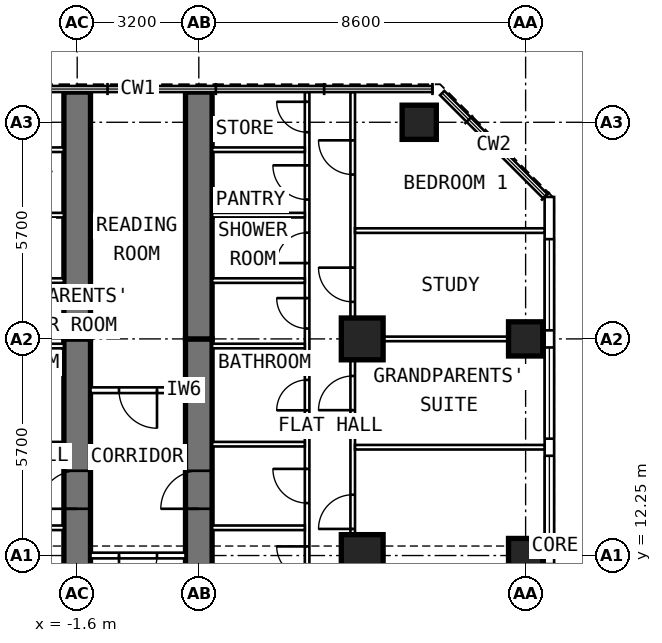
"""IFC4 building model, lengths in metres.
Left out: names, types, materials, properties, quantities, classifications, styles, units other than length and angle.
Written with IfcOpenShell. Run it as: python <this file> out.ifc"""

import sys

from ifc_helpers import new_model, si_unit, direction, frame, frame_2d, origin, origin_2d, place, context, subcontext, project, spatial, rectangle, extrude, element, fill, save


model = new_model("IFC4")
c1 = context("Model", 3, precision=1e-05, world=origin(), true_north=direction((0.0, 1.0)))
c2 = subcontext(c1, "Body", "Model", "MODEL_VIEW")
j1 = project(units=[si_unit("LENGTHUNIT", "METRE"), si_unit("PLANEANGLEUNIT", "RADIAN")], contexts=[c1])
p1 = place(None, origin())
s1 = spatial("IfcSite", under=j1, at=p1, CompositionType="ELEMENT")
p2 = place(p1, origin())
s2 = spatial("IfcBuilding", under=s1, at=p2, CompositionType="ELEMENT")
p3 = place(p2, frame((0.0, 0.0, 193.8)))
s3 = spatial("IfcBuildingStorey", under=s2, at=p3, CompositionType="ELEMENT", Elevation=193.8)
for number, where, z_axis, x_axis in (
    (1, (10.2, 12.25, 0.0), (0.0, 0.0, 1.0), (0.0, 1.0, 0.0)),
    (2, (10.2, 17.95, 0.0), (0.0, 0.0, 1.0), (0.0, 1.0, 0.0)),
    (3, (7.4, 23.65, 0.0), (0.0, 0.0, 1.0), (0.0, 1.0, 0.0)),
):
    element("IfcColumn", number, at=place(p3, frame(where, z_axis=z_axis, x_axis=x_axis)), inside=s3, PredefinedType="COLUMN", context=c2, shape_type="SweptSolid", body=[
        extrude(rectangle(XDim=0.9, YDim=0.9, at=origin_2d()), origin(), (0.0, 0.0, 1.0), 3.6),
    ])
for number, where, z_axis, x_axis in (
    (4, (5.9, 12.25, 0.0), (0.0, 0.0, 1.0), (0.0, 1.0, 0.0)),
    (5, (5.9, 17.95, 0.0), (0.0, 0.0, 1.0), (0.0, 1.0, 0.0)),
):
    element("IfcColumn", number, at=place(p3, frame(where, z_axis=z_axis, x_axis=x_axis)), inside=s3, PredefinedType="COLUMN", context=c2, shape_type="SweptSolid", body=[
        extrude(rectangle(XDim=1.1, YDim=1.1, at=origin_2d()), origin(), (0.0, 0.0, 1.0), 3.6),
    ])
p4 = place(p3, frame((-1.6, 9.6, 0.0), z_axis=(0.0, 0.0, 1.0), x_axis=(0.0, 1.0, 0.0)))
e6 = element("IfcWall", 6, at=p4, inside=s3, PredefinedType="SHEAR", context=c2, shape_type="SweptSolid", body=[
    extrude(rectangle(XDim=8.35, YDim=0.7, at=frame_2d((4.175, 0.0))), origin(), (0.0, 0.0, 1.0), 3.6),
])
p5 = place(p4, frame((3.88, 0.0, 0.0)))
e7 = element("IfcOpeningElement", 7, at=p5, cuts=e6, PredefinedType="OPENING", context=c2, shape_type="SweptSolid", body=[
    extrude(rectangle(XDim=1.0, YDim=2.1, at=frame_2d((0.5, 1.05))), frame((0.0, 0.362, 0.0), z_axis=(0.0, -1.0, 0.0), x_axis=(1.0, 0.0, 0.0)), (0.0, 0.0, 1.0), 0.724),
])
p6 = place(p3, frame((-1.6, 17.95, 0.0), z_axis=(0.0, 0.0, 1.0), x_axis=(0.0, 1.0, 0.0)))
e8 = element("IfcWall", 8, at=p6, inside=s3, PredefinedType="SHEAR", context=c2, shape_type="SweptSolid", body=[
    extrude(rectangle(XDim=6.495, YDim=0.7, at=frame_2d((3.248, 0.0))), origin(), (0.0, 0.0, 1.0), 3.6),
])
p7 = place(p3, frame((1.6, 9.6, 0.0), z_axis=(0.0, 0.0, 1.0), x_axis=(0.0, 1.0, 0.0)))
e9 = element("IfcWall", 9, at=p7, inside=s3, PredefinedType="SHEAR", context=c2, shape_type="SweptSolid", body=[
    extrude(rectangle(XDim=8.35, YDim=0.7, at=frame_2d((4.175, 0.0))), origin(), (0.0, 0.0, 1.0), 3.6),
])
p8 = place(p7, frame((3.88, 0.0, 0.0)))
e10 = element("IfcOpeningElement", 10, at=p8, cuts=e9, PredefinedType="OPENING", context=c2, shape_type="SweptSolid", body=[
    extrude(rectangle(XDim=1.0, YDim=2.1, at=frame_2d((0.5, 1.05))), frame((0.0, 0.362, 0.0), z_axis=(0.0, -1.0, 0.0), x_axis=(1.0, 0.0, 0.0)), (0.0, 0.0, 1.0), 0.724),
])
p9 = place(p3, frame((1.6, 17.95, 0.0), z_axis=(0.0, 0.0, 1.0), x_axis=(0.0, 1.0, 0.0)))
e11 = element("IfcWall", 11, at=p9, inside=s3, PredefinedType="SHEAR", context=c2, shape_type="SweptSolid", body=[
    extrude(rectangle(XDim=6.495, YDim=0.7, at=frame_2d((3.248, 0.0))), origin(), (0.0, 0.0, 1.0), 3.6),
])
p10 = place(p3, frame((10.825, 6.409, 0.0), z_axis=(0.0, 0.0, 1.0), x_axis=(0.0, 1.0, 0.0)))
e12 = element("IfcWall", 12, at=p10, inside=s3, PredefinedType="SOLIDWALL", context=c2, shape_type="SweptSolid", body=[
    extrude(rectangle(XDim=15.276, YDim=0.25, at=frame_2d((7.638, 0.0))), origin(), (0.0, 0.0, 1.0), 3.35),
])
p11 = place(p10, frame((0.366, 0.0, 0.8)))
e13 = element("IfcOpeningElement", 13, at=p11, cuts=e12, PredefinedType="OPENING", context=c2, shape_type="SweptSolid", body=[
    extrude(rectangle(XDim=2.4, YDim=1.8, at=frame_2d((1.2, 0.9))), frame((0.0, 0.137, 0.0), z_axis=(0.0, -1.0, 0.0), x_axis=(1.0, 0.0, 0.0)), (0.0, 0.0, 1.0), 0.274),
])
p12 = place(p10, frame((3.216, 0.0, 0.8)))
e14 = element("IfcOpeningElement", 14, at=p12, cuts=e12, PredefinedType="OPENING", context=c2, shape_type="SweptSolid", body=[
    extrude(rectangle(XDim=2.4, YDim=1.8, at=frame_2d((1.2, 0.9))), frame((0.0, 0.137, 0.0), z_axis=(0.0, -1.0, 0.0), x_axis=(1.0, 0.0, 0.0)), (0.0, 0.0, 1.0), 0.274),
])
p13 = place(p10, frame((6.066, 0.0, 0.8)))
e15 = element("IfcOpeningElement", 15, at=p13, cuts=e12, PredefinedType="OPENING", context=c2, shape_type="SweptSolid", body=[
    extrude(rectangle(XDim=2.4, YDim=1.8, at=frame_2d((1.2, 0.9))), frame((0.0, 0.137, 0.0), z_axis=(0.0, -1.0, 0.0), x_axis=(1.0, 0.0, 0.0)), (0.0, 0.0, 1.0), 0.274),
])
p14 = place(p10, frame((8.916, 0.0, 0.8)))
e16 = element("IfcOpeningElement", 16, at=p14, cuts=e12, PredefinedType="OPENING", context=c2, shape_type="SweptSolid", body=[
    extrude(rectangle(XDim=2.4, YDim=1.8, at=frame_2d((1.2, 0.9))), frame((0.0, 0.137, 0.0), z_axis=(0.0, -1.0, 0.0), x_axis=(1.0, 0.0, 0.0)), (0.0, 0.0, 1.0), 0.274),
])
p15 = place(p10, frame((11.766, 0.0, 0.8)))
e17 = element("IfcOpeningElement", 17, at=p15, cuts=e12, PredefinedType="OPENING", context=c2, shape_type="SweptSolid", body=[
    extrude(rectangle(XDim=2.4, YDim=1.8, at=frame_2d((1.2, 0.9))), frame((0.0, 0.137, 0.0), z_axis=(0.0, -1.0, 0.0), x_axis=(1.0, 0.0, 0.0)), (0.0, 0.0, 1.0), 0.274),
])
for number, where, z_axis, x_axis in (
    (18, (-1.95, 12.98, 0.0), (0.0, 0.0, 1.0), (-1.0, 0.0, 0.0)),
    (19, (-1.95, 15.18, 0.0), (0.0, 0.0, 1.0), (-1.0, 0.0, 0.0)),
):
    element("IfcWall", number, at=place(p3, frame(where, z_axis=z_axis, x_axis=x_axis)), inside=s3, PredefinedType="PARTITIONING", context=c2, shape_type="SweptSolid", body=[
        extrude(rectangle(XDim=2.44, YDim=0.12, at=frame_2d((1.22, 0.0))), origin(), (0.0, 0.0, 1.0), 3.35),
    ])
p16 = place(p3, frame((-1.95, 17.763, 0.0), z_axis=(0.0, 0.0, 1.0), x_axis=(-1.0, 0.0, 0.0)))
e20 = element("IfcWall", 20, at=p16, inside=s3, PredefinedType="PARTITIONING", context=c2, shape_type="SweptSolid", body=[
    extrude(rectangle(XDim=2.44, YDim=0.12, at=frame_2d((1.22, 0.0))), origin(), (0.0, 0.0, 1.0), 2.45),
])
for number, where, z_axis, x_axis in (
    (21, (-1.95, 19.485, 0.0), (0.0, 0.0, 1.0), (-1.0, 0.0, 0.0)),
    (22, (-1.95, 21.206, 0.0), (0.0, 0.0, 1.0), (-1.0, 0.0, 0.0)),
    (23, (-1.95, 22.928, 0.0), (0.0, 0.0, 1.0), (-1.0, 0.0, 0.0)),
):
    element("IfcWall", number, at=place(p3, frame(where, z_axis=z_axis, x_axis=x_axis)), inside=s3, PredefinedType="PARTITIONING", context=c2, shape_type="SweptSolid", body=[
        extrude(rectangle(XDim=2.44, YDim=0.12, at=frame_2d((1.22, 0.0))), origin(), (0.0, 0.0, 1.0), 3.35),
    ])
p17 = place(p3, frame((4.45, 9.925, 0.0), z_axis=(0.0, 0.0, 1.0), x_axis=(0.0, 1.0, 0.0)))
e24 = element("IfcWall", 24, at=p17, inside=s3, PredefinedType="PARTITIONING", context=c2, shape_type="SweptSolid", body=[
    extrude(rectangle(XDim=14.52, YDim=0.12, at=frame_2d((7.26, 0.0))), origin(), (0.0, 0.0, 1.0), 3.35),
])
p18 = place(p17, frame((1.765, 0.0, 0.0)))
e25 = element("IfcOpeningElement", 25, at=p18, cuts=e24, PredefinedType="OPENING", context=c2, shape_type="SweptSolid", body=[
    extrude(rectangle(XDim=0.8, YDim=2.1, at=frame_2d((0.4, 1.05))), frame((0.0, 0.072, 0.0), z_axis=(0.0, -1.0, 0.0), x_axis=(1.0, 0.0, 0.0)), (0.0, 0.0, 1.0), 0.144),
])
p19 = place(p17, frame((3.705, 0.0, 0.0)))
e26 = element("IfcOpeningElement", 26, at=p19, cuts=e24, PredefinedType="OPENING", context=c2, shape_type="SweptSolid", body=[
    extrude(rectangle(XDim=0.9, YDim=2.1, at=frame_2d((0.45, 1.05))), frame((0.0, 0.072, 0.0), z_axis=(0.0, -1.0, 0.0), x_axis=(1.0, 0.0, 0.0)), (0.0, 0.0, 1.0), 0.144),
])
p20 = place(p17, frame((6.146, 0.0, 0.0)))
e27 = element("IfcOpeningElement", 27, at=p20, cuts=e24, PredefinedType="OPENING", context=c2, shape_type="SweptSolid", body=[
    extrude(rectangle(XDim=0.8, YDim=2.1, at=frame_2d((0.4, 1.05))), frame((0.0, 0.072, 0.0), z_axis=(0.0, -1.0, 0.0), x_axis=(1.0, 0.0, 0.0)), (0.0, 0.0, 1.0), 0.144),
])
p21 = place(p17, frame((8.299, 0.0, 0.0)))
e28 = element("IfcOpeningElement", 28, at=p21, cuts=e24, PredefinedType="OPENING", context=c2, shape_type="SweptSolid", body=[
    extrude(rectangle(XDim=0.8, YDim=2.1, at=frame_2d((0.4, 1.05))), frame((0.0, 0.072, 0.0), z_axis=(0.0, -1.0, 0.0), x_axis=(1.0, 0.0, 0.0)), (0.0, 0.0, 1.0), 0.144),
])
p22 = place(p17, frame((10.021, 0.0, 0.0)))
e29 = element("IfcOpeningElement", 29, at=p22, cuts=e24, PredefinedType="OPENING", context=c2, shape_type="SweptSolid", body=[
    extrude(rectangle(XDim=0.8, YDim=2.1, at=frame_2d((0.4, 1.05))), frame((0.0, 0.072, 0.0), z_axis=(0.0, -1.0, 0.0), x_axis=(1.0, 0.0, 0.0)), (0.0, 0.0, 1.0), 0.144),
])
p23 = place(p17, frame((11.692, 0.0, 0.0)))
e30 = element("IfcOpeningElement", 30, at=p23, cuts=e24, PredefinedType="OPENING", context=c2, shape_type="SweptSolid", body=[
    extrude(rectangle(XDim=0.9, YDim=2.1, at=frame_2d((0.45, 1.05))), frame((0.0, 0.072, 0.0), z_axis=(0.0, -1.0, 0.0), x_axis=(1.0, 0.0, 0.0)), (0.0, 0.0, 1.0), 0.144),
])
p24 = place(p17, frame((13.464, 0.0, 0.0)))
e31 = element("IfcOpeningElement", 31, at=p24, cuts=e24, PredefinedType="OPENING", context=c2, shape_type="SweptSolid", body=[
    extrude(rectangle(XDim=0.8, YDim=2.1, at=frame_2d((0.4, 1.05))), frame((0.0, 0.072, 0.0), z_axis=(0.0, -1.0, 0.0), x_axis=(1.0, 0.0, 0.0)), (0.0, 0.0, 1.0), 0.144),
])
p25 = place(p3, frame((5.65, 9.6, 0.0), z_axis=(0.0, 0.0, 1.0), x_axis=(0.0, 1.0, 0.0)))
e32 = element("IfcWall", 32, at=p25, inside=s3, PredefinedType="PARTITIONING", context=c2, shape_type="SweptSolid", body=[
    extrude(rectangle(XDim=14.845, YDim=0.12, at=frame_2d((7.422, 0.0))), origin(), (0.0, 0.0, 1.0), 3.35),
])
p26 = place(p25, frame((3.35, 0.0, 0.0)))
e33 = element("IfcOpeningElement", 33, at=p26, cuts=e32, PredefinedType="OPENING", context=c2, shape_type="SweptSolid", body=[
    extrude(rectangle(XDim=0.9, YDim=2.1, at=frame_2d((0.45, 1.05))), frame((0.0, 0.072, 0.0), z_axis=(0.0, -1.0, 0.0), x_axis=(1.0, 0.0, 0.0)), (0.0, 0.0, 1.0), 0.144),
])
p27 = place(p25, frame((6.475, 0.0, 0.0)))
e34 = element("IfcOpeningElement", 34, at=p27, cuts=e32, PredefinedType="OPENING", context=c2, shape_type="SweptSolid", body=[
    extrude(rectangle(XDim=0.9, YDim=2.1, at=frame_2d((0.45, 1.05))), frame((0.0, 0.072, 0.0), z_axis=(0.0, -1.0, 0.0), x_axis=(1.0, 0.0, 0.0)), (0.0, 0.0, 1.0), 0.144),
])
p28 = place(p25, frame((9.325, 0.0, 0.0)))
e35 = element("IfcOpeningElement", 35, at=p28, cuts=e32, PredefinedType="OPENING", context=c2, shape_type="SweptSolid", body=[
    extrude(rectangle(XDim=0.9, YDim=2.1, at=frame_2d((0.45, 1.05))), frame((0.0, 0.072, 0.0), z_axis=(0.0, -1.0, 0.0), x_axis=(1.0, 0.0, 0.0)), (0.0, 0.0, 1.0), 0.144),
])
p29 = place(p25, frame((12.675, 0.0, 0.0)))
e36 = element("IfcOpeningElement", 36, at=p29, cuts=e32, PredefinedType="OPENING", context=c2, shape_type="SweptSolid", body=[
    extrude(rectangle(XDim=0.9, YDim=2.1, at=frame_2d((0.45, 1.05))), frame((0.0, 0.072, 0.0), z_axis=(0.0, -1.0, 0.0), x_axis=(1.0, 0.0, 0.0)), (0.0, 0.0, 1.0), 0.144),
])
p30 = place(p3, frame((5.71, 15.1, 0.0), z_axis=(0.0, 0.0, 1.0), x_axis=(1.0, 0.0, 0.0)))
e37 = element("IfcWall", 37, at=p30, inside=s3, PredefinedType="PARTITIONING", context=c2, shape_type="SweptSolid", body=[
    extrude(rectangle(XDim=4.99, YDim=0.12, at=frame_2d((2.495, 0.0))), origin(), (0.0, 0.0, 1.0), 3.35),
])
p31 = place(p3, frame((5.71, 17.95, 0.0), z_axis=(0.0, 0.0, 1.0), x_axis=(1.0, 0.0, 0.0)))
e38 = element("IfcWall", 38, at=p31, inside=s3, PredefinedType="PARTITIONING", context=c2, shape_type="SweptSolid", body=[
    extrude(rectangle(XDim=4.99, YDim=0.12, at=frame_2d((2.495, 0.0))), origin(), (0.0, 0.0, 1.0), 2.45),
])
p32 = place(p3, frame((5.71, 20.8, 0.0), z_axis=(0.0, 0.0, 1.0), x_axis=(1.0, 0.0, 0.0)))
e39 = element("IfcWall", 39, at=p32, inside=s3, PredefinedType="PARTITIONING", context=c2, shape_type="SweptSolid", body=[
    extrude(rectangle(XDim=4.99, YDim=0.12, at=frame_2d((2.495, 0.0))), origin(), (0.0, 0.0, 1.0), 3.35),
])
for number, where, z_axis, x_axis in (
    (40, (1.95, 12.98, 0.0), (0.0, 0.0, 1.0), (1.0, 0.0, 0.0)),
    (41, (1.95, 15.18, 0.0), (0.0, 0.0, 1.0), (1.0, 0.0, 0.0)),
):
    element("IfcWall", number, at=place(p3, frame(where, z_axis=z_axis, x_axis=x_axis)), inside=s3, PredefinedType="PARTITIONING", context=c2, shape_type="SweptSolid", body=[
        extrude(rectangle(XDim=2.44, YDim=0.12, at=frame_2d((1.22, 0.0))), origin(), (0.0, 0.0, 1.0), 3.35),
    ])
p33 = place(p3, frame((1.95, 17.763, 0.0), z_axis=(0.0, 0.0, 1.0), x_axis=(1.0, 0.0, 0.0)))
e42 = element("IfcWall", 42, at=p33, inside=s3, PredefinedType="PARTITIONING", context=c2, shape_type="SweptSolid", body=[
    extrude(rectangle(XDim=2.44, YDim=0.12, at=frame_2d((1.22, 0.0))), origin(), (0.0, 0.0, 1.0), 2.45),
])
for number, where, z_axis, x_axis in (
    (43, (1.95, 19.485, 0.0), (0.0, 0.0, 1.0), (1.0, 0.0, 0.0)),
    (44, (1.95, 21.206, 0.0), (0.0, 0.0, 1.0), (1.0, 0.0, 0.0)),
    (45, (1.95, 22.928, 0.0), (0.0, 0.0, 1.0), (1.0, 0.0, 0.0)),
):
    element("IfcWall", number, at=place(p3, frame(where, z_axis=z_axis, x_axis=x_axis)), inside=s3, PredefinedType="PARTITIONING", context=c2, shape_type="SweptSolid", body=[
        extrude(rectangle(XDim=2.44, YDim=0.12, at=frame_2d((1.22, 0.0))), origin(), (0.0, 0.0, 1.0), 3.35),
    ])
p34 = place(p3, frame((1.25, 16.6, 0.0), z_axis=(0.0, 0.0, 1.0), x_axis=(-1.0, 0.0, 0.0)))
e46 = element("IfcWall", 46, at=p34, inside=s3, PredefinedType="PARTITIONING", context=c2, shape_type="SweptSolid", body=[
    extrude(rectangle(XDim=2.5, YDim=0.15, at=frame_2d((1.25, 0.0))), origin(), (0.0, 0.0, 1.0), 3.35),
])
p35 = place(p34, frame((0.75, 0.0, 0.0)))
e47 = element("IfcOpeningElement", 47, at=p35, cuts=e46, PredefinedType="OPENING", context=c2, shape_type="SweptSolid", body=[
    extrude(rectangle(XDim=1.0, YDim=2.1, at=frame_2d((0.5, 1.05))), frame((0.0, 0.087, 0.0), z_axis=(0.0, -1.0, 0.0), x_axis=(1.0, 0.0, 0.0)), (0.0, 0.0, 1.0), 0.174),
])
p36 = place(p3, frame((1.25, 12.25, 0.0), z_axis=(0.0, 0.0, 1.0), x_axis=(-1.0, 0.0, 0.0)))
e48 = element("IfcWall", 48, at=p36, inside=s3, PredefinedType="PARTITIONING", context=c2, shape_type="SweptSolid", body=[
    extrude(rectangle(XDim=2.5, YDim=0.15, at=frame_2d((1.25, 0.0))), origin(), (0.0, 0.0, 1.0), 3.35),
])
p37 = place(p36, frame((0.75, 0.0, 0.0)))
e49 = element("IfcOpeningElement", 49, at=p37, cuts=e48, PredefinedType="OPENING", context=c2, shape_type="SweptSolid", body=[
    extrude(rectangle(XDim=1.0, YDim=2.1, at=frame_2d((0.5, 1.05))), frame((0.0, 0.087, 0.0), z_axis=(0.0, -1.0, 0.0), x_axis=(1.0, 0.0, 0.0)), (0.0, 0.0, 1.0), 0.174),
])
p38 = place(p13, origin())
e50 = element("IfcWindow", 50, at=p38, inside=s3, PartitioningType="SINGLE_PANEL", PredefinedType="WINDOW", context=c2, shape_type="SweptSolid", body=[
    extrude(rectangle(XDim=2.4, YDim=1.8, at=frame_2d((1.2, 0.9))), frame((0.0, 0.03, 0.0), z_axis=(0.0, -1.0, 0.0), x_axis=(1.0, 0.0, 0.0)), (0.0, 0.0, 1.0), 0.06),
])
fill(e15, e50)
p39 = place(p14, origin())
e51 = element("IfcWindow", 51, at=p39, inside=s3, PartitioningType="SINGLE_PANEL", PredefinedType="WINDOW", context=c2, shape_type="SweptSolid", body=[
    extrude(rectangle(XDim=2.4, YDim=1.8, at=frame_2d((1.2, 0.9))), frame((0.0, 0.03, 0.0), z_axis=(0.0, -1.0, 0.0), x_axis=(1.0, 0.0, 0.0)), (0.0, 0.0, 1.0), 0.06),
])
fill(e16, e51)
p40 = place(p15, origin())
e52 = element("IfcWindow", 52, at=p40, inside=s3, PartitioningType="SINGLE_PANEL", PredefinedType="WINDOW", context=c2, shape_type="SweptSolid", body=[
    extrude(rectangle(XDim=2.4, YDim=1.8, at=frame_2d((1.2, 0.9))), frame((0.0, 0.03, 0.0), z_axis=(0.0, -1.0, 0.0), x_axis=(1.0, 0.0, 0.0)), (0.0, 0.0, 1.0), 0.06),
])
fill(e17, e52)
p41 = place(p5, origin())
e53 = element("IfcDoor", 53, at=p41, inside=s3, OperationType="SINGLE_SWING_LEFT", PredefinedType="DOOR", context=c2, shape_type="SweptSolid", body=[
    extrude(rectangle(XDim=1.0, YDim=2.1, at=frame_2d((0.5, 1.05))), frame((0.0, 0.1, 0.0), z_axis=(0.0, -1.0, 0.0), x_axis=(1.0, 0.0, 0.0)), (0.0, 0.0, 1.0), 0.2),
])
fill(e7, e53)
p42 = place(p8, origin())
e54 = element("IfcDoor", 54, at=p42, inside=s3, OperationType="SINGLE_SWING_LEFT", PredefinedType="DOOR", context=c2, shape_type="SweptSolid", body=[
    extrude(rectangle(XDim=1.0, YDim=2.1, at=frame_2d((0.5, 1.05))), frame((0.0, 0.1, 0.0), z_axis=(0.0, -1.0, 0.0), x_axis=(1.0, 0.0, 0.0)), (0.0, 0.0, 1.0), 0.2),
])
fill(e10, e54)
p43 = place(p26, origin())
e55 = element("IfcDoor", 55, at=p43, inside=s3, OperationType="SINGLE_SWING_LEFT", PredefinedType="DOOR", context=c2, shape_type="SweptSolid", body=[
    extrude(rectangle(XDim=0.9, YDim=2.1, at=frame_2d((0.45, 1.05))), frame((0.0, 0.025, 0.0), z_axis=(0.0, -1.0, 0.0), x_axis=(1.0, 0.0, 0.0)), (0.0, 0.0, 1.0), 0.05),
])
fill(e33, e55)
p44 = place(p27, origin())
e56 = element("IfcDoor", 56, at=p44, inside=s3, OperationType="SINGLE_SWING_LEFT", PredefinedType="DOOR", context=c2, shape_type="SweptSolid", body=[
    extrude(rectangle(XDim=0.9, YDim=2.1, at=frame_2d((0.45, 1.05))), frame((0.0, 0.025, 0.0), z_axis=(0.0, -1.0, 0.0), x_axis=(1.0, 0.0, 0.0)), (0.0, 0.0, 1.0), 0.05),
])
fill(e34, e56)
p45 = place(p28, origin())
e57 = element("IfcDoor", 57, at=p45, inside=s3, OperationType="SINGLE_SWING_RIGHT", PredefinedType="DOOR", context=c2, shape_type="SweptSolid", body=[
    extrude(rectangle(XDim=0.9, YDim=2.1, at=frame_2d((0.45, 1.05))), frame((0.0, 0.025, 0.0), z_axis=(0.0, -1.0, 0.0), x_axis=(1.0, 0.0, 0.0)), (0.0, 0.0, 1.0), 0.05),
])
fill(e35, e57)
p46 = place(p29, origin())
e58 = element("IfcDoor", 58, at=p46, inside=s3, OperationType="SINGLE_SWING_RIGHT", PredefinedType="DOOR", context=c2, shape_type="SweptSolid", body=[
    extrude(rectangle(XDim=0.9, YDim=2.1, at=frame_2d((0.45, 1.05))), frame((0.0, 0.025, 0.0), z_axis=(0.0, -1.0, 0.0), x_axis=(1.0, 0.0, 0.0)), (0.0, 0.0, 1.0), 0.05),
])
fill(e36, e58)
p47 = place(p18, origin())
e59 = element("IfcDoor", 59, at=p47, inside=s3, OperationType="SINGLE_SWING_RIGHT", PredefinedType="DOOR", context=c2, shape_type="SweptSolid", body=[
    extrude(rectangle(XDim=0.8, YDim=2.1, at=frame_2d((0.4, 1.05))), frame((0.0, 0.025, 0.0), z_axis=(0.0, -1.0, 0.0), x_axis=(1.0, 0.0, 0.0)), (0.0, 0.0, 1.0), 0.05),
])
fill(e25, e59)
p48 = place(p19, origin())
e60 = element("IfcDoor", 60, at=p48, inside=s3, OperationType="SINGLE_SWING_RIGHT", PredefinedType="DOOR", context=c2, shape_type="SweptSolid", body=[
    extrude(rectangle(XDim=0.9, YDim=2.1, at=frame_2d((0.45, 1.05))), frame((0.0, 0.025, 0.0), z_axis=(0.0, -1.0, 0.0), x_axis=(1.0, 0.0, 0.0)), (0.0, 0.0, 1.0), 0.05),
])
fill(e26, e60)
p49 = place(p20, origin())
e61 = element("IfcDoor", 61, at=p49, inside=s3, OperationType="SINGLE_SWING_LEFT", PredefinedType="DOOR", context=c2, shape_type="SweptSolid", body=[
    extrude(rectangle(XDim=0.8, YDim=2.1, at=frame_2d((0.4, 1.05))), frame((0.0, 0.025, 0.0), z_axis=(0.0, -1.0, 0.0), x_axis=(1.0, 0.0, 0.0)), (0.0, 0.0, 1.0), 0.05),
])
fill(e27, e61)
p50 = place(p21, origin())
e62 = element("IfcDoor", 62, at=p50, inside=s3, OperationType="SINGLE_SWING_RIGHT", PredefinedType="DOOR", context=c2, shape_type="SweptSolid", body=[
    extrude(rectangle(XDim=0.8, YDim=2.1, at=frame_2d((0.4, 1.05))), frame((0.0, 0.025, 0.0), z_axis=(0.0, -1.0, 0.0), x_axis=(1.0, 0.0, 0.0)), (0.0, 0.0, 1.0), 0.05),
])
fill(e28, e62)
p51 = place(p22, origin())
e63 = element("IfcDoor", 63, at=p51, inside=s3, OperationType="SINGLE_SWING_LEFT", PredefinedType="DOOR", context=c2, shape_type="SweptSolid", body=[
    extrude(rectangle(XDim=0.8, YDim=2.1, at=frame_2d((0.4, 1.05))), frame((0.0, 0.025, 0.0), z_axis=(0.0, -1.0, 0.0), x_axis=(1.0, 0.0, 0.0)), (0.0, 0.0, 1.0), 0.05),
])
fill(e29, e63)
p52 = place(p23, origin())
e64 = element("IfcDoor", 64, at=p52, inside=s3, OperationType="SINGLE_SWING_RIGHT", PredefinedType="DOOR", context=c2, shape_type="SweptSolid", body=[
    extrude(rectangle(XDim=0.9, YDim=2.1, at=frame_2d((0.45, 1.05))), frame((0.0, 0.025, 0.0), z_axis=(0.0, -1.0, 0.0), x_axis=(1.0, 0.0, 0.0)), (0.0, 0.0, 1.0), 0.05),
])
fill(e30, e64)
p53 = place(p24, origin())
e65 = element("IfcDoor", 65, at=p53, inside=s3, OperationType="SINGLE_SWING_RIGHT", PredefinedType="DOOR", context=c2, shape_type="SweptSolid", body=[
    extrude(rectangle(XDim=0.8, YDim=2.1, at=frame_2d((0.4, 1.05))), frame((0.0, 0.025, 0.0), z_axis=(0.0, -1.0, 0.0), x_axis=(1.0, 0.0, 0.0)), (0.0, 0.0, 1.0), 0.05),
])
fill(e31, e65)
p54 = place(p35, origin())
e66 = element("IfcDoor", 66, at=p54, inside=s3, OperationType="SINGLE_SWING_LEFT", PredefinedType="DOOR", context=c2, shape_type="SweptSolid", body=[
    extrude(rectangle(XDim=1.0, YDim=2.1, at=frame_2d((0.5, 1.05))), frame((0.0, 0.025, 0.0), z_axis=(0.0, -1.0, 0.0), x_axis=(1.0, 0.0, 0.0)), (0.0, 0.0, 1.0), 0.05),
])
fill(e47, e66)
p55 = place(p37, origin())
e67 = element("IfcDoor", 67, at=p55, inside=s3, OperationType="SINGLE_SWING_RIGHT", PredefinedType="DOOR", context=c2, shape_type="SweptSolid", body=[
    extrude(rectangle(XDim=1.0, YDim=2.1, at=frame_2d((0.5, 1.05))), frame((0.0, 0.025, 0.0), z_axis=(0.0, -1.0, 0.0), x_axis=(1.0, 0.0, 0.0)), (0.0, 0.0, 1.0), 0.05),
])
fill(e49, e67)
save(model, sys.argv[1])
